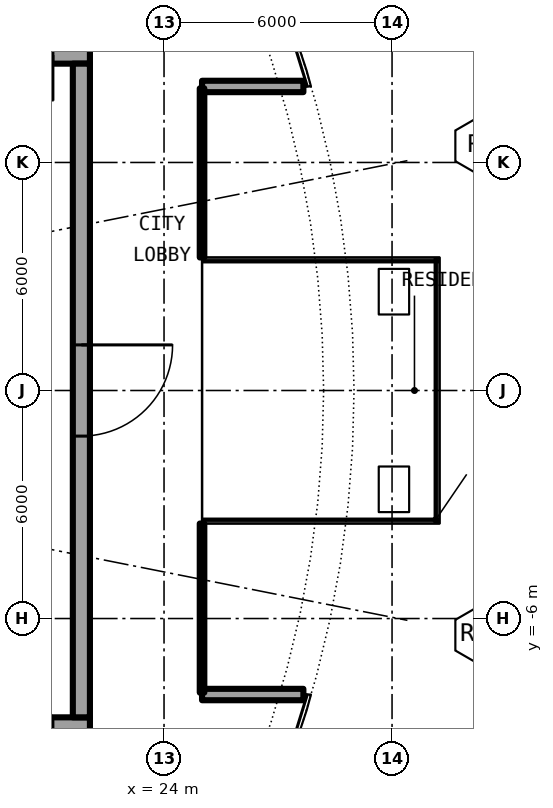
"""IFC4 building model, lengths in metres.
Left out: names, types, materials, properties, quantities, classifications, styles, units other than length and angle.
Written with IfcOpenShell. Run it as: python <this file> out.ifc"""

import sys

from ifc_helpers import new_model, si_unit, direction, frame, frame_2d, origin, place, context, subcontext, project, spatial, rectangle, extrude, element, fill, save


model = new_model("IFC4")
c1 = context("Model", 3, precision=1e-05, world=origin(), true_north=direction((0.0, 1.0)))
c2 = subcontext(c1, "Body", "Model", "MODEL_VIEW")
j1 = project(units=[si_unit("LENGTHUNIT", "METRE"), si_unit("PLANEANGLEUNIT", "RADIAN")], contexts=[c1])
p1 = place(None, origin())
s1 = spatial("IfcSite", under=j1, at=p1, CompositionType="ELEMENT")
p2 = place(p1, origin())
s2 = spatial("IfcBuilding", under=s1, at=p2, CompositionType="ELEMENT")
p3 = place(p2, frame((0.0, 0.0, 221.85)))
s3 = spatial("IfcBuildingStorey", under=s2, at=p3, CompositionType="ELEMENT", Elevation=221.85)
for number, where, z_axis, x_axis in (
    (1, (25.0, 8.0, 0.0), (0.0, 0.0, 1.0), (1.0, 0.0, 0.0)),
    (2, (25.0, -8.0, 0.0), (0.0, 0.0, 1.0), (1.0, 0.0, 0.0)),
):
    element("IfcWall", number, at=place(p3, frame(where, z_axis=z_axis, x_axis=x_axis)), inside=s3, PredefinedType="SOLIDWALL", context=c2, shape_type="SweptSolid", body=[
        extrude(rectangle(XDim=2.667, YDim=0.3, at=frame_2d((1.333, 0.0))), origin(), (0.0, 0.0, 1.0), 5.75),
    ])
p4 = place(p3, frame((22.05, 8.825, 0.0), z_axis=(0.0, 0.0, 1.0), x_axis=(-1.0, 0.0, 0.0)))
e3 = element("IfcWall", 3, at=p4, inside=s3, PredefinedType="SHEAR", context=c2, shape_type="SweptSolid", body=[
    extrude(rectangle(XDim=13.5, YDim=0.45, at=frame_2d((6.75, 0.0))), origin(), (0.0, 0.0, 1.0), 6.1),
])
p5 = place(p4, frame((0.975, 0.0, 0.0)))
e4 = element("IfcOpeningElement", 4, at=p5, cuts=e3, PredefinedType="OPENING", context=c2, shape_type="SweptSolid", body=[
    extrude(rectangle(XDim=1.2, YDim=2.3, at=frame_2d((0.6, 1.15))), frame((0.0, 0.235, 0.0), z_axis=(0.0, -1.0, 0.0), x_axis=(1.0, 0.0, 0.0)), (0.0, 0.0, 1.0), 0.47),
])
p6 = place(p3, frame((8.55, -8.825, 0.0), z_axis=(0.0, 0.0, 1.0), x_axis=(1.0, 0.0, 0.0)))
e5 = element("IfcWall", 5, at=p6, inside=s3, PredefinedType="SHEAR", context=c2, shape_type="SweptSolid", body=[
    extrude(rectangle(XDim=13.5, YDim=0.45, at=frame_2d((6.75, 0.0))), origin(), (0.0, 0.0, 1.0), 6.1),
])
p7 = place(p6, frame((11.325, 0.0, 0.0)))
e6 = element("IfcOpeningElement", 6, at=p7, cuts=e5, PredefinedType="OPENING", context=c2, shape_type="SweptSolid", body=[
    extrude(rectangle(XDim=1.2, YDim=2.3, at=frame_2d((0.6, 1.15))), frame((0.0, 0.235, 0.0), z_axis=(0.0, -1.0, 0.0), x_axis=(1.0, 0.0, 0.0)), (0.0, 0.0, 1.0), 0.47),
])
p8 = place(p3, frame((21.825, 8.6, 0.0), z_axis=(0.0, 0.0, 1.0), x_axis=(0.0, -1.0, 0.0)))
e7 = element("IfcWall", 7, at=p8, inside=s3, PredefinedType="SHEAR", context=c2, shape_type="SweptSolid", body=[
    extrude(rectangle(XDim=17.2, YDim=0.45, at=frame_2d((8.6, 0.0))), origin(), (0.0, 0.0, 1.0), 6.1),
])
p9 = place(p8, frame((7.4, 0.0, 0.0)))
e8 = element("IfcOpeningElement", 8, at=p9, cuts=e7, PredefinedType="OPENING", context=c2, shape_type="SweptSolid", body=[
    extrude(rectangle(XDim=2.4, YDim=2.3, at=frame_2d((1.2, 1.15))), frame((0.0, 0.235, 0.0), z_axis=(0.0, -1.0, 0.0), x_axis=(1.0, 0.0, 0.0)), (0.0, 0.0, 1.0), 0.47),
])
p10 = place(p3, frame((25.0, -3.5, 0.0), z_axis=(0.0, 0.0, 1.0), x_axis=(0.0, -1.0, 0.0)))
e9 = element("IfcWall", 9, at=p10, inside=s3, PredefinedType="PARTITIONING", context=c2, shape_type="SweptSolid", body=[
    extrude(rectangle(XDim=4.45, YDim=0.12, at=frame_2d((2.225, 0.0))), origin(), (0.0, 0.0, 1.0), 5.75),
])
p11 = place(p10, frame((0.4, 0.0, 0.1)))
e10 = element("IfcOpeningElement", 10, at=p11, cuts=e9, PredefinedType="OPENING", context=c2, shape_type="SweptSolid", body=[
    extrude(rectangle(XDim=3.6, YDim=5.4, at=frame_2d((1.8, 2.7))), frame((0.0, 0.07, 0.0), z_axis=(0.0, -1.0, 0.0), x_axis=(1.0, 0.0, 0.0)), (0.0, 0.0, 1.0), 0.14),
])
p12 = place(p3, frame((25.0, 3.5, 0.0), z_axis=(0.0, 0.0, 1.0), x_axis=(0.0, 1.0, 0.0)))
e11 = element("IfcWall", 11, at=p12, inside=s3, PredefinedType="PARTITIONING", context=c2, shape_type="SweptSolid", body=[
    extrude(rectangle(XDim=4.45, YDim=0.12, at=frame_2d((2.225, 0.0))), origin(), (0.0, 0.0, 1.0), 5.75),
])
p13 = place(p12, frame((0.4, 0.0, 0.1)))
e12 = element("IfcOpeningElement", 12, at=p13, cuts=e11, PredefinedType="OPENING", context=c2, shape_type="SweptSolid", body=[
    extrude(rectangle(XDim=3.6, YDim=5.4, at=frame_2d((1.8, 2.7))), frame((0.0, 0.07, 0.0), z_axis=(0.0, -1.0, 0.0), x_axis=(1.0, 0.0, 0.0)), (0.0, 0.0, 1.0), 0.14),
])
p14 = place(p5, origin())
e13 = element("IfcDoor", 13, at=p14, inside=s3, OperationType="SINGLE_SWING_RIGHT", PredefinedType="DOOR", context=c2, shape_type="SweptSolid", body=[
    extrude(rectangle(XDim=1.2, YDim=2.3, at=frame_2d((0.6, 1.15))), frame((0.0, 0.025, 0.0), z_axis=(0.0, -1.0, 0.0), x_axis=(1.0, 0.0, 0.0)), (0.0, 0.0, 1.0), 0.05),
])
fill(e4, e13)
p15 = place(p7, origin())
e14 = element("IfcDoor", 14, at=p15, inside=s3, OperationType="SINGLE_SWING_LEFT", PredefinedType="DOOR", context=c2, shape_type="SweptSolid", body=[
    extrude(rectangle(XDim=1.2, YDim=2.3, at=frame_2d((0.6, 1.15))), frame((0.0, 0.025, 0.0), z_axis=(0.0, -1.0, 0.0), x_axis=(1.0, 0.0, 0.0)), (0.0, 0.0, 1.0), 0.05),
])
fill(e6, e14)
p16 = place(p9, origin())
e15 = element("IfcDoor", 15, at=p16, inside=s3, OperationType="SINGLE_SWING_LEFT", PredefinedType="DOOR", context=c2, shape_type="SweptSolid", body=[
    extrude(rectangle(XDim=2.4, YDim=2.3, at=frame_2d((1.2, 1.15))), frame((0.0, 0.025, 0.0), z_axis=(0.0, -1.0, 0.0), x_axis=(1.0, 0.0, 0.0)), (0.0, 0.0, 1.0), 0.05),
])
fill(e8, e15)
p17 = place(p11, origin())
e16 = element("IfcWindow", 16, at=p17, inside=s3, PartitioningType="SINGLE_PANEL", PredefinedType="WINDOW", context=c2, shape_type="SweptSolid", body=[
    extrude(rectangle(XDim=3.6, YDim=5.4, at=frame_2d((1.8, 2.7))), frame((0.0, 0.03, 0.0), z_axis=(0.0, -1.0, 0.0), x_axis=(1.0, 0.0, 0.0)), (0.0, 0.0, 1.0), 0.06),
])
fill(e10, e16)
p18 = place(p13, origin())
e17 = element("IfcWindow", 17, at=p18, inside=s3, PartitioningType="SINGLE_PANEL", PredefinedType="WINDOW", context=c2, shape_type="SweptSolid", body=[
    extrude(rectangle(XDim=3.6, YDim=5.4, at=frame_2d((1.8, 2.7))), frame((0.0, 0.03, 0.0), z_axis=(0.0, -1.0, 0.0), x_axis=(1.0, 0.0, 0.0)), (0.0, 0.0, 1.0), 0.06),
])
fill(e12, e17)
save(model, sys.argv[1])
